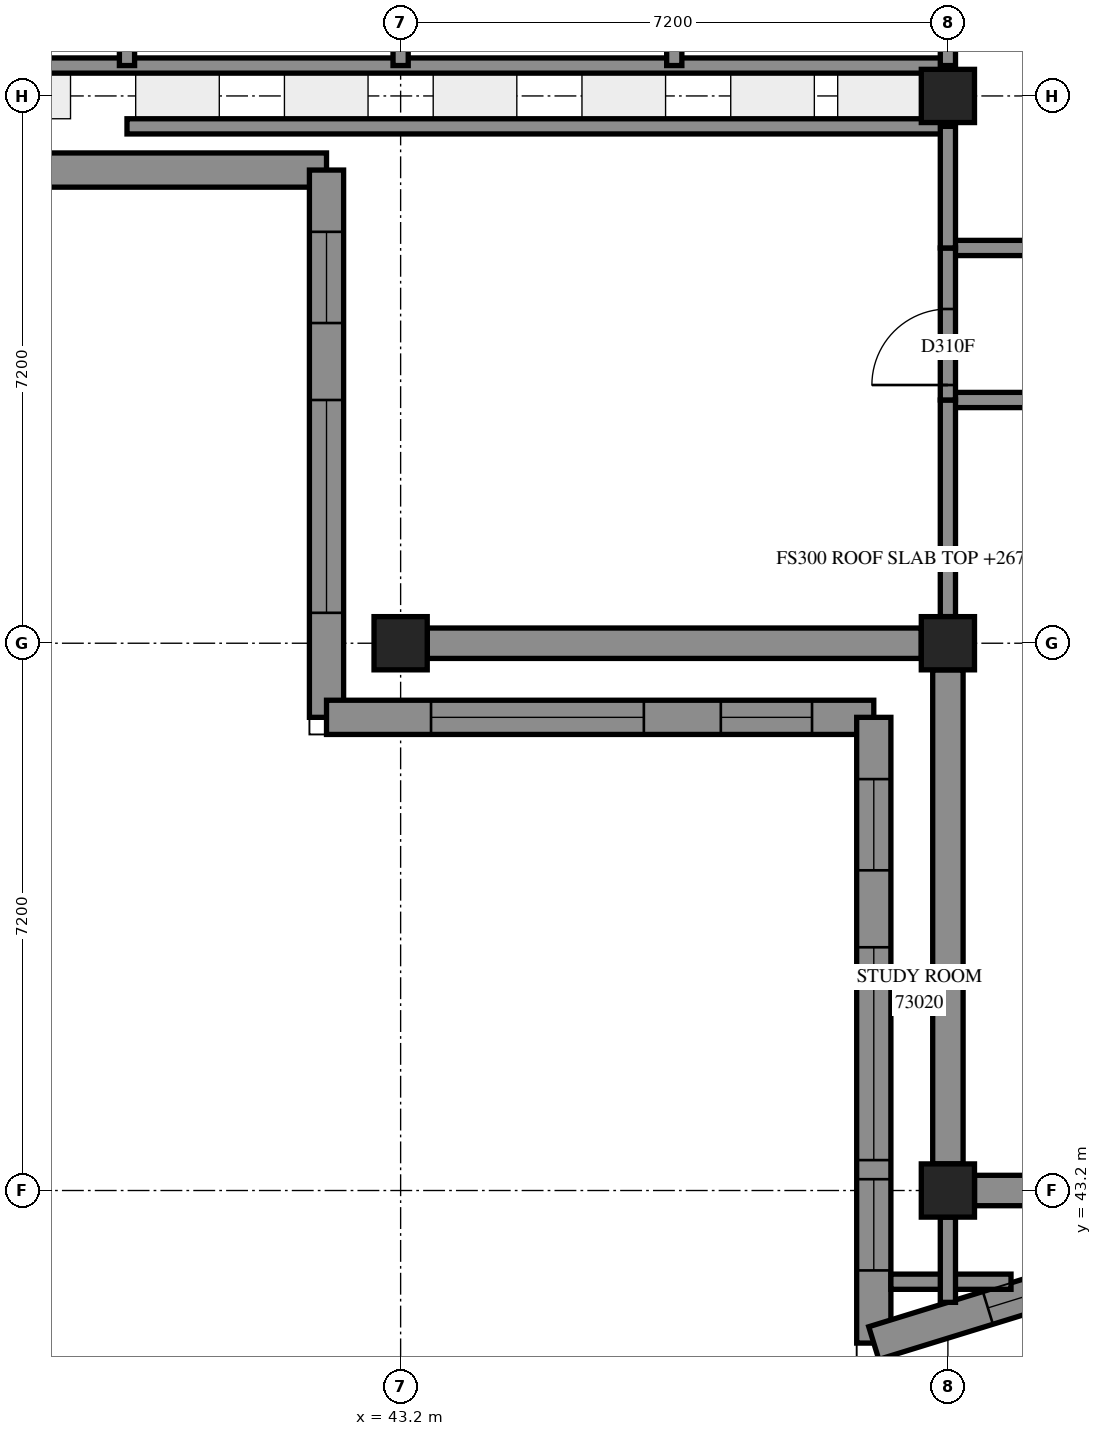
"""IFC4 building model, lengths in metres.
Left out: names, types, materials, properties, quantities, classifications, styles, units other than length and angle.
Written with IfcOpenShell. Run it as: python <this file> out.ifc"""

import sys

from ifc_helpers import new_model, si_unit, direction, frame, frame_2d, origin, origin_2d, place, context, subcontext, project, spatial, polyline, rectangle, outline, extrude, element, fill, save


model = new_model("IFC4")
c1 = context("Model", 3, precision=1e-05, world=origin(), true_north=direction((0.0, 1.0)))
c2 = subcontext(c1, "Body", "Model", "MODEL_VIEW")
j1 = project(units=[si_unit("LENGTHUNIT", "METRE"), si_unit("PLANEANGLEUNIT", "RADIAN")], contexts=[c1])
p1 = place(None, origin())
s1 = spatial("IfcSite", under=j1, at=p1, CompositionType="ELEMENT")
p2 = place(p1, origin())
s2 = spatial("IfcBuilding", under=s1, at=p2, CompositionType="ELEMENT")
p3 = place(p2, frame((0.0, 0.0, 267.6)))
s3 = spatial("IfcBuildingStorey", under=s2, at=p3, CompositionType="ELEMENT", Elevation=267.6)
for number, where, z_axis, x_axis in (
    (1, (43.2, 50.4, 0.0), (0.0, 0.0, 1.0), (1.0, 0.0, 0.0)),
    (2, (50.4, 43.2, 0.0), (0.0, 0.0, 1.0), (1.0, 0.0, 0.0)),
    (3, (50.4, 50.4, 0.0), (0.0, 0.0, 1.0), (1.0, 0.0, 0.0)),
    (4, (50.4, 57.6, 0.0), (0.0, 0.0, 1.0), (1.0, 0.0, 0.0)),
):
    element("IfcColumn", number, at=place(p3, frame(where, z_axis=z_axis, x_axis=x_axis)), inside=s3, PredefinedType="COLUMN", context=c2, shape_type="SweptSolid", body=[
        extrude(rectangle(XDim=0.7, YDim=0.7, at=origin_2d()), origin(), (0.0, 0.0, 1.0), 3.1),
    ])
p4 = place(p3, frame((35.025, 56.625, 0.0), z_axis=(0.0, 0.0, 1.0), x_axis=(1.0, 0.0, 0.0)))
e5 = element("IfcWall", 5, at=p4, inside=s3, PredefinedType="SOLIDWALL", context=c2, shape_type="SweptSolid", body=[
    extrude(outline(polyline([(-0.225, -0.225), (6.975, -0.225), (7.425, 0.225), (0.225, 0.225), (-0.225, -0.225)])), origin(), (0.0, 0.0, 1.0), 3.1),
])
p5 = place(p3, frame((42.225, 56.625, 0.0), z_axis=(0.0, 0.0, 1.0), x_axis=(0.0, -1.0, 0.0)))
e6 = element("IfcWall", 6, at=p5, inside=s3, PredefinedType="SOLIDWALL", context=c2, shape_type="SweptSolid", body=[
    extrude(outline(polyline([(0.225, -0.225), (7.425, -0.225), (6.975, 0.225), (-0.225, 0.225), (0.225, -0.225)])), origin(), (0.0, 0.0, 1.0), 3.1),
])
p6 = place(p5, frame((3.025, 0.0, 0.45)))
e7 = element("IfcOpeningElement", 7, at=p6, cuts=e6, PredefinedType="OPENING", context=c2, shape_type="SweptSolid", body=[
    extrude(rectangle(XDim=2.8, YDim=2.55, at=frame_2d((1.4, 1.275))), frame((0.0, 0.235, 0.0), z_axis=(0.0, -1.0, 0.0), x_axis=(1.0, 0.0, 0.0)), (0.0, 0.0, 1.0), 0.47),
])
p7 = place(p5, frame((0.812, 0.0, 0.45)))
e8 = element("IfcOpeningElement", 8, at=p7, cuts=e6, PredefinedType="OPENING", context=c2, shape_type="SweptSolid", body=[
    extrude(rectangle(XDim=1.2, YDim=2.55, at=frame_2d((0.6, 1.275))), frame((0.0, 0.235, 0.0), z_axis=(0.0, -1.0, 0.0), x_axis=(1.0, 0.0, 0.0)), (0.0, 0.0, 1.0), 0.47),
])
p8 = place(p3, frame((42.225, 49.425, 0.0), z_axis=(0.0, 0.0, 1.0), x_axis=(1.0, 0.0, 0.0)))
e9 = element("IfcWall", 9, at=p8, inside=s3, PredefinedType="SOLIDWALL", context=c2, shape_type="SweptSolid", body=[
    extrude(outline(polyline([(-0.225, -0.225), (6.975, -0.225), (7.425, 0.225), (0.225, 0.225), (-0.225, -0.225)])), origin(), (0.0, 0.0, 1.0), 3.1),
])
p9 = place(p8, frame((1.375, 0.0, 0.45)))
e10 = element("IfcOpeningElement", 10, at=p9, cuts=e9, PredefinedType="OPENING", context=c2, shape_type="SweptSolid", body=[
    extrude(rectangle(XDim=2.8, YDim=2.55, at=frame_2d((1.4, 1.275))), frame((0.0, 0.235, 0.0), z_axis=(0.0, -1.0, 0.0), x_axis=(1.0, 0.0, 0.0)), (0.0, 0.0, 1.0), 0.47),
])
p10 = place(p8, frame((5.188, 0.0, 0.45)))
e11 = element("IfcOpeningElement", 11, at=p10, cuts=e9, PredefinedType="OPENING", context=c2, shape_type="SweptSolid", body=[
    extrude(rectangle(XDim=1.2, YDim=2.55, at=frame_2d((0.6, 1.275))), frame((0.0, 0.235, 0.0), z_axis=(0.0, -1.0, 0.0), x_axis=(1.0, 0.0, 0.0)), (0.0, 0.0, 1.0), 0.47),
])
p11 = place(p3, frame((49.425, 49.425, 0.0), z_axis=(0.0, 0.0, 1.0), x_axis=(0.0, -1.0, 0.0)))
e12 = element("IfcWall", 12, at=p11, inside=s3, PredefinedType="SOLIDWALL", context=c2, shape_type="SweptSolid", body=[
    extrude(outline(polyline([(0.225, -0.225), (8.537, -0.225), (7.927, 0.225), (-0.225, 0.225), (0.225, -0.225)])), origin(), (0.0, 0.0, 1.0), 3.1),
])
p12 = place(p11, frame((3.025, 0.0, 0.45)))
e13 = element("IfcOpeningElement", 13, at=p12, cuts=e12, PredefinedType="OPENING", context=c2, shape_type="SweptSolid", body=[
    extrude(rectangle(XDim=2.8, YDim=2.55, at=frame_2d((1.4, 1.275))), frame((0.0, 0.235, 0.0), z_axis=(0.0, -1.0, 0.0), x_axis=(1.0, 0.0, 0.0)), (0.0, 0.0, 1.0), 0.47),
])
p13 = place(p11, frame((0.812, 0.0, 0.45)))
e14 = element("IfcOpeningElement", 14, at=p13, cuts=e12, PredefinedType="OPENING", context=c2, shape_type="SweptSolid", body=[
    extrude(rectangle(XDim=1.2, YDim=2.55, at=frame_2d((0.6, 1.275))), frame((0.0, 0.235, 0.0), z_axis=(0.0, -1.0, 0.0), x_axis=(1.0, 0.0, 0.0)), (0.0, 0.0, 1.0), 0.47),
])
p14 = place(p11, frame((6.076, 0.0, 0.45)))
e15 = element("IfcOpeningElement", 15, at=p14, cuts=e12, PredefinedType="OPENING", context=c2, shape_type="SweptSolid", body=[
    extrude(rectangle(XDim=1.2, YDim=2.55, at=frame_2d((0.6, 1.275))), frame((0.0, 0.235, 0.0), z_axis=(0.0, -1.0, 0.0), x_axis=(1.0, 0.0, 0.0)), (0.0, 0.0, 1.0), 0.47),
])
p15 = place(p3, frame((49.425, 41.193, 0.0), z_axis=(0.0, 0.0, 1.0), x_axis=(0.9556573555, 0.2944809312, 0.0)))
e16 = element("IfcWall", 16, at=p15, inside=s3, PredefinedType="SOLIDWALL", context=c2, shape_type="SweptSolid", body=[
    extrude(outline(polyline([(-0.305, -0.225), (3.471, -0.225), (3.572, 0.225), (0.305, 0.225), (-0.305, -0.225)])), origin(), (0.0, 0.0, 1.0), 3.1),
])
p16 = place(p15, frame((1.571, 0.0, 0.45)))
e17 = element("IfcOpeningElement", 17, at=p16, cuts=e16, PredefinedType="OPENING", context=c2, shape_type="SweptSolid", body=[
    extrude(rectangle(XDim=1.2, YDim=2.55, at=frame_2d((0.6, 1.275))), frame((0.0, 0.235, 0.0), z_axis=(0.0, -1.0, 0.0), x_axis=(1.0, 0.0, 0.0)), (0.0, 0.0, 1.0), 0.47),
])
p17 = place(p3, frame((36.0, 58.0, 0.0), z_axis=(0.0, 0.0, 1.0), x_axis=(1.0, 0.0, 0.0)))
e18 = element("IfcWall", 18, at=p17, inside=s3, PredefinedType="PARTITIONING", context=c2, shape_type="SweptSolid", body=[
    extrude(rectangle(XDim=14.4, YDim=0.2, at=frame_2d((7.2, 0.0))), origin(), (0.0, 0.0, 1.0), 3.1),
])
p18 = place(p3, frame((39.6, 57.2, 0.0), z_axis=(0.0, 0.0, 1.0), x_axis=(1.0, 0.0, 0.0)))
e19 = element("IfcWall", 19, at=p18, inside=s3, PredefinedType="PARTITIONING", context=c2, shape_type="SweptSolid", body=[
    extrude(rectangle(XDim=10.8, YDim=0.2, at=frame_2d((5.4, 0.0))), origin(), (0.0, 0.0, 1.0), 3.1),
])
p19 = place(p3, frame((50.4, 43.55, 0.0), z_axis=(0.0, 0.0, 1.0), x_axis=(0.0, 1.0, 0.0)))
e20 = element("IfcWall", 20, at=p19, inside=s3, PredefinedType="PARTITIONING", context=c2, shape_type="SweptSolid", body=[
    extrude(rectangle(XDim=6.5, YDim=0.2, at=frame_2d((3.25, 0.0))), origin(), (0.0, 0.0, 1.0), 2.6),
])
p20 = place(p3, frame((50.4, 53.6, 0.0), z_axis=(0.0, 0.0, 1.0), x_axis=(1.0, 0.0, 0.0)))
e21 = element("IfcWall", 21, at=p20, inside=s3, PredefinedType="PARTITIONING", context=c2, shape_type="SweptSolid", body=[
    extrude(rectangle(XDim=4.8, YDim=0.2, at=frame_2d((2.4, 0.0))), origin(), (0.0, 0.0, 1.0), 3.1),
])
p21 = place(p20, frame((2.075, 0.0, 0.0)))
e22 = element("IfcOpeningElement", 22, at=p21, cuts=e21, PredefinedType="OPENING", context=c2, shape_type="SweptSolid", body=[
    extrude(rectangle(XDim=1.0, YDim=2.1, at=frame_2d((0.5, 1.05))), frame((0.0, 0.11, 0.0), z_axis=(0.0, -1.0, 0.0), x_axis=(1.0, 0.0, 0.0)), (0.0, 0.0, 1.0), 0.22),
])
p22 = place(p3, frame((50.4, 50.75, 0.0), z_axis=(0.0, 0.0, 1.0), x_axis=(0.0, 1.0, 0.0)))
e23 = element("IfcWall", 23, at=p22, inside=s3, PredefinedType="PARTITIONING", context=c2, shape_type="SweptSolid", body=[
    extrude(rectangle(XDim=2.85, YDim=0.2, at=frame_2d((1.425, 0.0))), origin(), (0.0, 0.0, 1.0), 3.1),
])
for number, where, z_axis, x_axis in (
    (24, (39.6, 58.0, 0.0), (0.0, 0.0, 1.0), (0.0, 1.0, 0.0)),
    (25, (43.2, 58.0, 0.0), (0.0, 0.0, 1.0), (0.0, 1.0, 0.0)),
    (26, (46.8, 58.0, 0.0), (0.0, 0.0, 1.0), (0.0, 1.0, 0.0)),
    (27, (50.4, 58.0, 0.0), (0.0, 0.0, 1.0), (0.0, 1.0, 0.0)),
):
    element("IfcWall", number, at=place(p3, frame(where, z_axis=z_axis, x_axis=x_axis)), inside=s3, PredefinedType="PARTITIONING", context=c2, shape_type="SweptSolid", body=[
        extrude(rectangle(XDim=2.8, YDim=0.2, at=frame_2d((1.4, 0.0))), origin(), (0.0, 0.0, 1.0), 3.1),
    ])
p23 = place(p3, frame((50.4, 55.6, 0.0), z_axis=(0.0, 0.0, 1.0), x_axis=(1.0, 0.0, 0.0)))
e28 = element("IfcWall", 28, at=p23, inside=s3, PredefinedType="PARTITIONING", context=c2, shape_type="SweptSolid", body=[
    extrude(rectangle(XDim=2.6, YDim=0.2, at=frame_2d((1.3, 0.0))), origin(), (0.0, 0.0, 1.0), 3.1),
])
p24 = place(p3, frame((50.4, 53.6, 0.0), z_axis=(0.0, 0.0, 1.0), x_axis=(0.0, 1.0, 0.0)))
e29 = element("IfcWall", 29, at=p24, inside=s3, PredefinedType="PARTITIONING", context=c2, shape_type="SweptSolid", body=[
    extrude(rectangle(XDim=2.0, YDim=0.2, at=frame_2d((1.0, 0.0))), origin(), (0.0, 0.0, 1.0), 3.1),
])
p25 = place(p24, frame((0.197, 0.0, 0.0)))
e30 = element("IfcOpeningElement", 30, at=p25, cuts=e29, PredefinedType="OPENING", context=c2, shape_type="SweptSolid", body=[
    extrude(rectangle(XDim=1.0, YDim=2.1, at=frame_2d((0.5, 1.05))), frame((0.0, 0.11, 0.0), z_axis=(0.0, -1.0, 0.0), x_axis=(1.0, 0.0, 0.0)), (0.0, 0.0, 1.0), 0.22),
])
p26 = place(p3, frame((50.4, 55.6, 0.0), z_axis=(0.0, 0.0, 1.0), x_axis=(0.0, 1.0, 0.0)))
e31 = element("IfcWall", 31, at=p26, inside=s3, PredefinedType="PARTITIONING", context=c2, shape_type="SweptSolid", body=[
    extrude(rectangle(XDim=1.6, YDim=0.2, at=frame_2d((0.8, 0.0))), origin(), (0.0, 0.0, 1.0), 3.1),
])
p27 = place(p3, frame((49.65, 42.0, 0.0), z_axis=(0.0, 0.0, 1.0), x_axis=(1.0, 0.0, 0.0)))
e32 = element("IfcWall", 32, at=p27, inside=s3, PredefinedType="PARTITIONING", context=c2, shape_type="SweptSolid", body=[
    extrude(rectangle(XDim=1.581, YDim=0.2, at=frame_2d((0.79, 0.0))), origin(), (0.0, 0.0, 1.0), 3.1),
])
p28 = place(p3, frame((50.4, 41.729, 0.0), z_axis=(0.0, 0.0, 1.0), x_axis=(0.0, 1.0, 0.0)))
e33 = element("IfcWall", 33, at=p28, inside=s3, PredefinedType="PARTITIONING", context=c2, shape_type="SweptSolid", body=[
    extrude(rectangle(XDim=1.121, YDim=0.2, at=frame_2d((0.561, 0.0))), origin(), (0.0, 0.0, 1.0), 3.1),
])
p29 = place(p6, origin())
e34 = element("IfcWindow", 34, at=p29, inside=s3, PartitioningType="SINGLE_PANEL", PredefinedType="WINDOW", context=c2, shape_type="SweptSolid", body=[
    extrude(rectangle(XDim=2.8, YDim=2.55, at=frame_2d((1.4, 1.275))), frame((0.0, 0.205, 0.0), z_axis=(0.0, -1.0, 0.0), x_axis=(1.0, 0.0, 0.0)), (0.0, 0.0, 1.0), 0.06),
])
fill(e7, e34)
p30 = place(p7, origin())
e35 = element("IfcWindow", 35, at=p30, inside=s3, PartitioningType="SINGLE_PANEL", PredefinedType="WINDOW", context=c2, shape_type="SweptSolid", body=[
    extrude(rectangle(XDim=1.2, YDim=2.55, at=frame_2d((0.6, 1.275))), frame((0.0, 0.205, 0.0), z_axis=(0.0, -1.0, 0.0), x_axis=(1.0, 0.0, 0.0)), (0.0, 0.0, 1.0), 0.06),
])
fill(e8, e35)
p31 = place(p9, origin())
e36 = element("IfcWindow", 36, at=p31, inside=s3, PartitioningType="SINGLE_PANEL", PredefinedType="WINDOW", context=c2, shape_type="SweptSolid", body=[
    extrude(rectangle(XDim=2.8, YDim=2.55, at=frame_2d((1.4, 1.275))), frame((0.0, 0.205, 0.0), z_axis=(0.0, -1.0, 0.0), x_axis=(1.0, 0.0, 0.0)), (0.0, 0.0, 1.0), 0.06),
])
fill(e10, e36)
p32 = place(p10, origin())
e37 = element("IfcWindow", 37, at=p32, inside=s3, PartitioningType="SINGLE_PANEL", PredefinedType="WINDOW", context=c2, shape_type="SweptSolid", body=[
    extrude(rectangle(XDim=1.2, YDim=2.55, at=frame_2d((0.6, 1.275))), frame((0.0, 0.205, 0.0), z_axis=(0.0, -1.0, 0.0), x_axis=(1.0, 0.0, 0.0)), (0.0, 0.0, 1.0), 0.06),
])
fill(e11, e37)
p33 = place(p12, origin())
e38 = element("IfcWindow", 38, at=p33, inside=s3, PartitioningType="SINGLE_PANEL", PredefinedType="WINDOW", context=c2, shape_type="SweptSolid", body=[
    extrude(rectangle(XDim=2.8, YDim=2.55, at=frame_2d((1.4, 1.275))), frame((0.0, 0.205, 0.0), z_axis=(0.0, -1.0, 0.0), x_axis=(1.0, 0.0, 0.0)), (0.0, 0.0, 1.0), 0.06),
])
fill(e13, e38)
p34 = place(p13, origin())
e39 = element("IfcWindow", 39, at=p34, inside=s3, PartitioningType="SINGLE_PANEL", PredefinedType="WINDOW", context=c2, shape_type="SweptSolid", body=[
    extrude(rectangle(XDim=1.2, YDim=2.55, at=frame_2d((0.6, 1.275))), frame((0.0, 0.205, 0.0), z_axis=(0.0, -1.0, 0.0), x_axis=(1.0, 0.0, 0.0)), (0.0, 0.0, 1.0), 0.06),
])
fill(e14, e39)
p35 = place(p14, origin())
e40 = element("IfcWindow", 40, at=p35, inside=s3, PartitioningType="SINGLE_PANEL", PredefinedType="WINDOW", context=c2, shape_type="SweptSolid", body=[
    extrude(rectangle(XDim=1.2, YDim=2.55, at=frame_2d((0.6, 1.275))), frame((0.0, 0.205, 0.0), z_axis=(0.0, -1.0, 0.0), x_axis=(1.0, 0.0, 0.0)), (0.0, 0.0, 1.0), 0.06),
])
fill(e15, e40)
p36 = place(p16, origin())
e41 = element("IfcWindow", 41, at=p36, inside=s3, PartitioningType="SINGLE_PANEL", PredefinedType="WINDOW", context=c2, shape_type="SweptSolid", body=[
    extrude(rectangle(XDim=1.2, YDim=2.55, at=frame_2d((0.6, 1.275))), frame((0.0, 0.105, 0.0), z_axis=(0.0, -1.0, 0.0), x_axis=(1.0, 0.0, 0.0)), (0.0, 0.0, 1.0), 0.06),
])
fill(e17, e41)
p37 = place(p25, origin())
e42 = element("IfcDoor", 42, at=p37, inside=s3, OperationType="SINGLE_SWING_LEFT", PredefinedType="DOOR", context=c2, shape_type="SweptSolid", body=[
    extrude(rectangle(XDim=1.0, YDim=2.1, at=frame_2d((0.5, 1.05))), frame((0.0, 0.025, 0.0), z_axis=(0.0, -1.0, 0.0), x_axis=(1.0, 0.0, 0.0)), (0.0, 0.0, 1.0), 0.05),
])
fill(e30, e42)
save(model, sys.argv[1])
